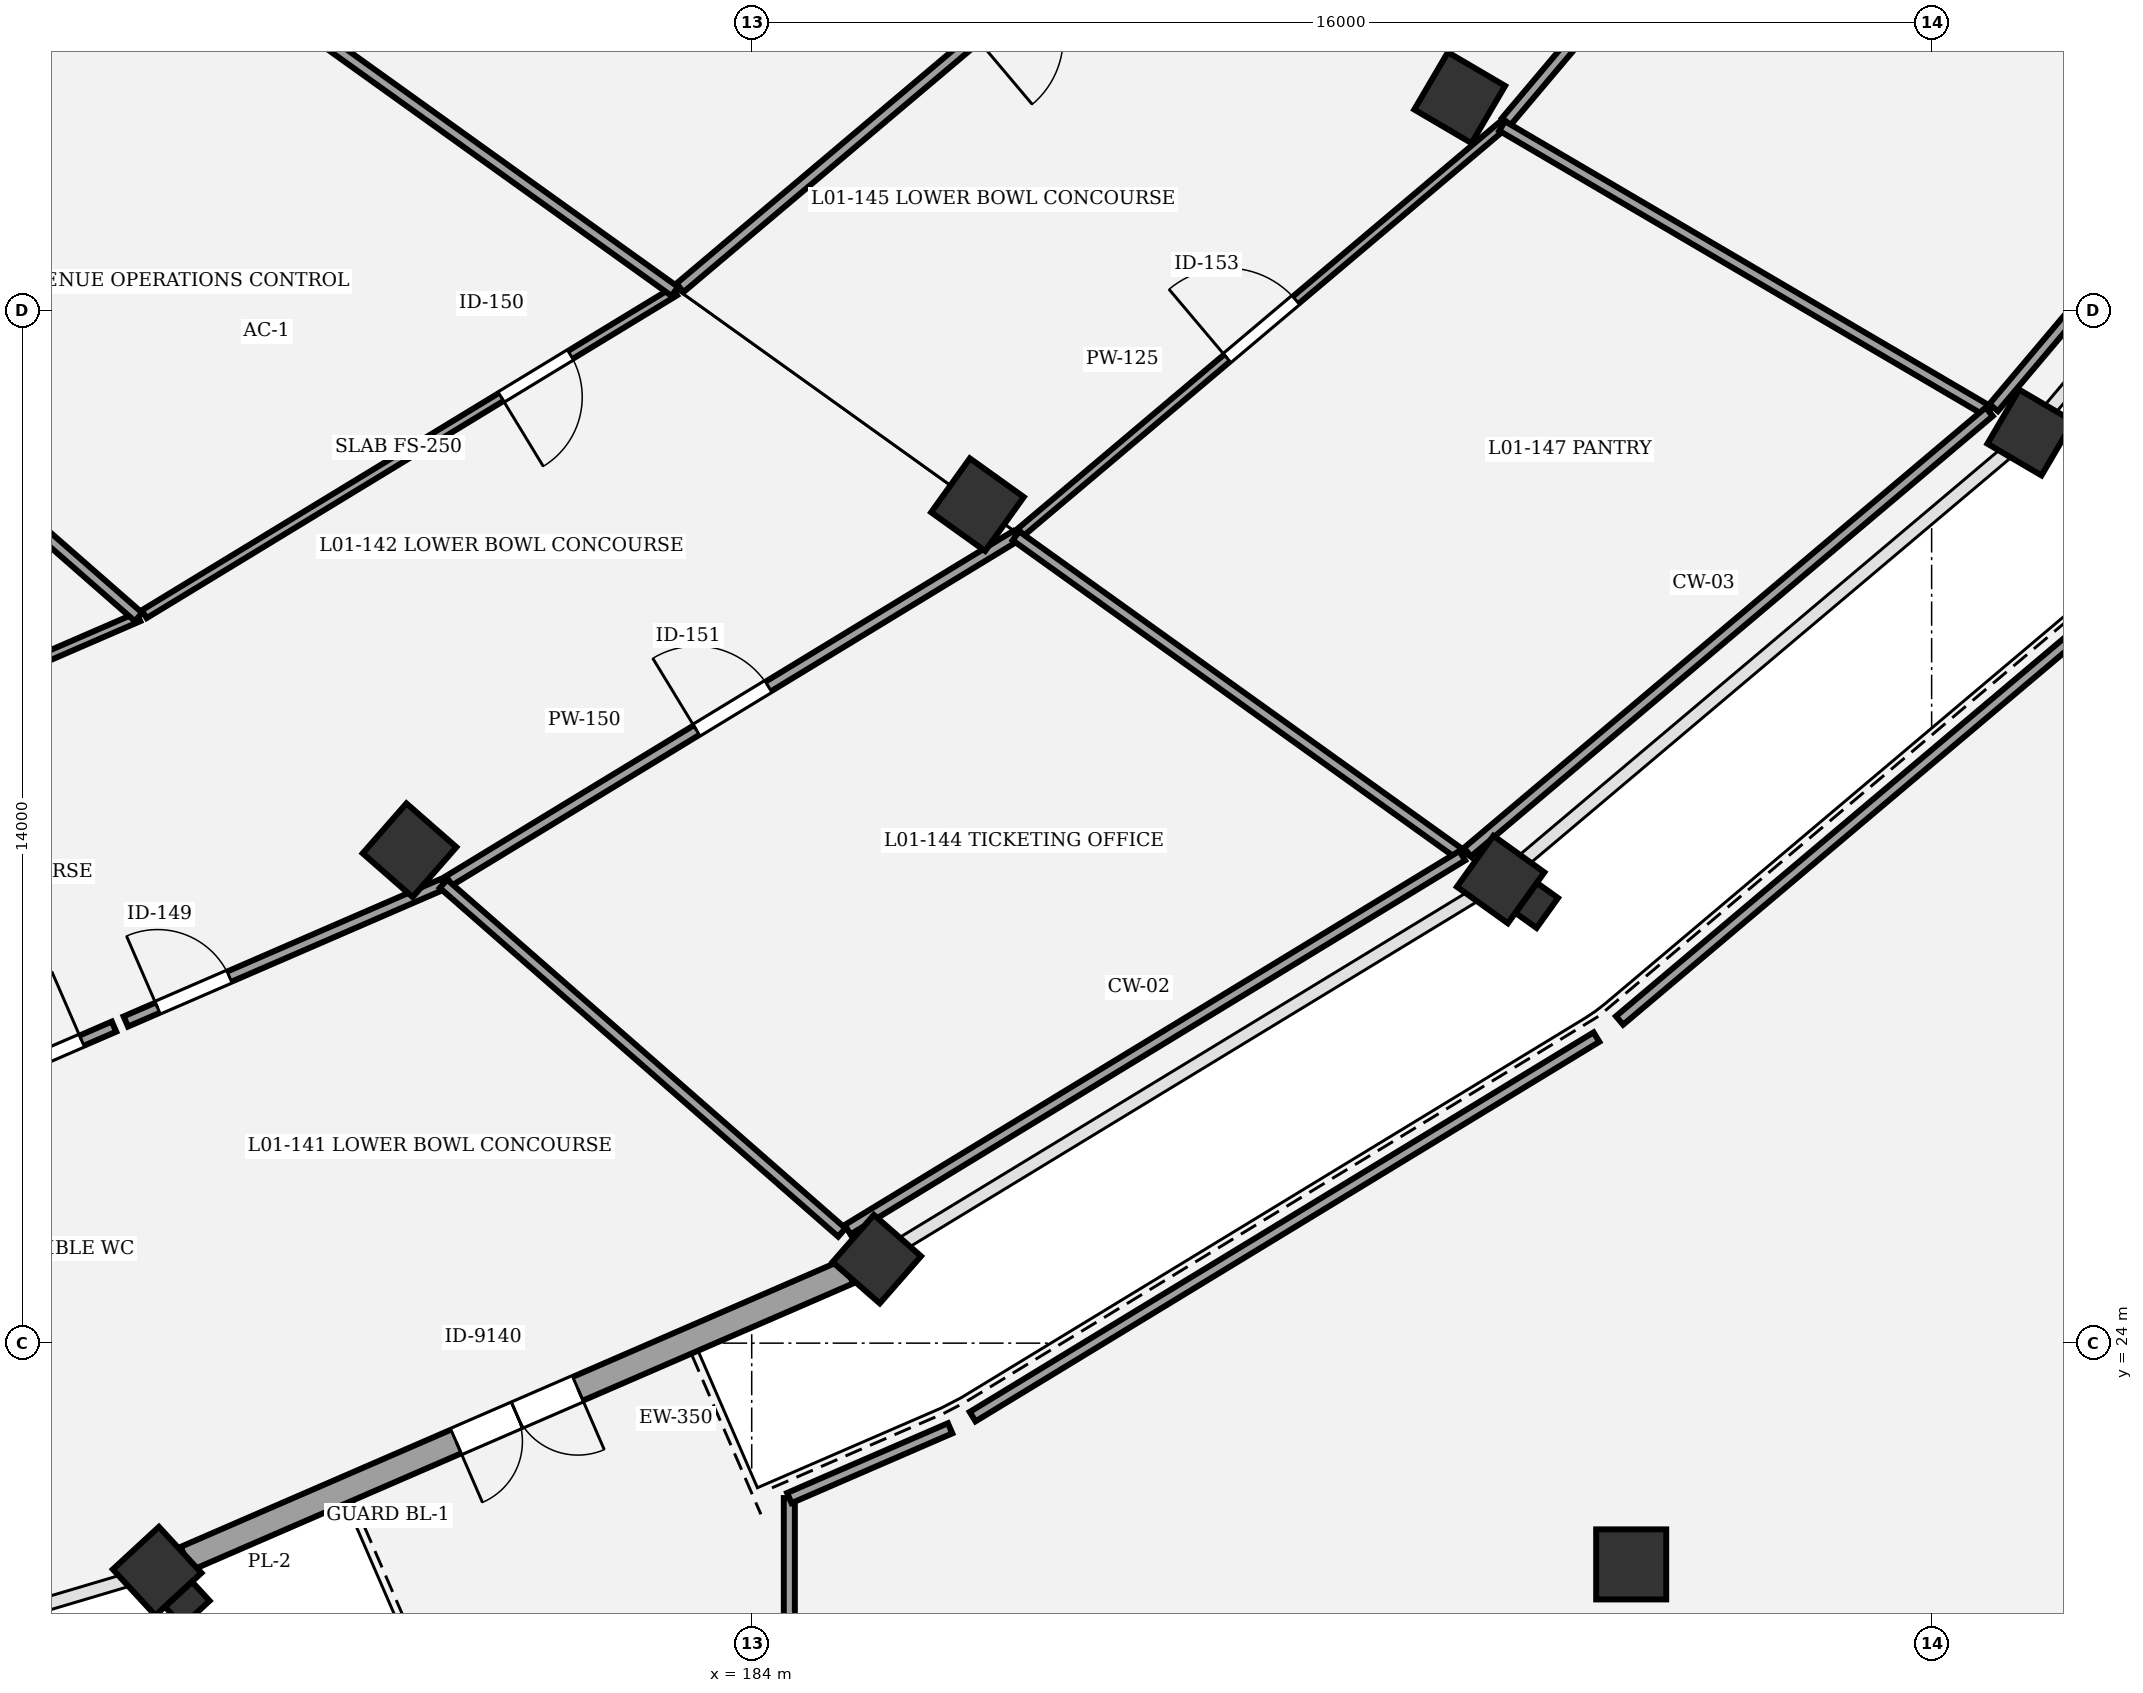
"""IFC4 building model, lengths in metres.
Left out: names, types, materials, properties, quantities, classifications, styles, units other than length and angle.
Written with IfcOpenShell. Run it as: python <this file> out.ifc"""

import sys

from ifc_helpers import new_model, si_unit, direction, frame, frame_2d, origin, origin_2d, place, context, subcontext, project, spatial, rectangle, circle, extrude, element, fill, save


model = new_model("IFC4")
c1 = context("Model", 3, precision=1e-05, world=origin(), true_north=direction((0.0, 1.0)))
c2 = subcontext(c1, "Body", "Model", "MODEL_VIEW")
j1 = project(units=[si_unit("LENGTHUNIT", "METRE"), si_unit("PLANEANGLEUNIT", "RADIAN")], contexts=[c1])
p1 = place(None, origin())
s1 = spatial("IfcSite", under=j1, at=p1, CompositionType="ELEMENT")
p2 = place(p1, origin())
s2 = spatial("IfcBuilding", under=s1, at=p2, CompositionType="ELEMENT")
p3 = place(p2, frame((0.0, 0.0, 5.4)))
s3 = spatial("IfcBuildingStorey", under=s2, at=p3, CompositionType="ELEMENT", Elevation=5.4)
p4 = place(p3, frame((175.938, 20.909, 0.0), z_axis=(0.0, 0.0, 1.0), x_axis=(0.677903094969, -0.735151272753, 0.0)))
e1 = element("IfcColumn", 1, at=p4, inside=s3, PredefinedType="COLUMN", context=c2, shape_type="SweptSolid", body=[
    extrude(rectangle(XDim=0.85, YDim=0.85, at=origin_2d()), origin(), (0.0, 0.0, 1.0), 4.8),
])
p5 = place(p3, frame((176.346, 20.465, 0.0), z_axis=(0.0, 0.0, 1.0), x_axis=(0.735151272753, 0.677903094969, 0.0)))
e2 = element("IfcColumn", 2, at=p5, inside=s3, PredefinedType="PILASTER", context=c2, shape_type="SweptSolid", body=[
    extrude(rectangle(XDim=0.5, YDim=0.35, at=origin_2d()), origin(), (0.0, 0.0, 1.0), 4.8),
])
p6 = place(p3, frame((179.36, 30.683, 0.0), z_axis=(0.0, 0.0, 1.0), x_axis=(0.752529860433, -0.658558128912, 0.0)))
e3 = element("IfcColumn", 3, at=p6, inside=s3, PredefinedType="COLUMN", context=c2, shape_type="SweptSolid", body=[
    extrude(rectangle(XDim=0.9, YDim=0.9, at=origin_2d()), origin(), (0.0, 0.0, 1.0), 4.8),
])
p7 = place(p3, frame((185.696, 25.139, 0.0), z_axis=(0.0, 0.0, 1.0), x_axis=(0.752529860433, -0.658558128912, 0.0)))
e4 = element("IfcColumn", 4, at=p7, inside=s3, PredefinedType="COLUMN", context=c2, shape_type="SweptSolid", body=[
    extrude(rectangle(XDim=0.85, YDim=0.85, at=origin_2d()), origin(), (0.0, 0.0, 1.0), 4.8),
])
p8 = place(p3, frame((187.061, 35.368, 0.0), z_axis=(0.0, 0.0, 1.0), x_axis=(0.812897512265, -0.582406760395, 0.0)))
e5 = element("IfcColumn", 5, at=p8, inside=s3, PredefinedType="COLUMN", context=c2, shape_type="SweptSolid", body=[
    extrude(rectangle(XDim=0.9, YDim=0.9, at=origin_2d()), origin(), (0.0, 0.0, 1.0), 4.8),
])
p9 = place(p3, frame((194.156, 30.285, 0.0), z_axis=(0.0, 0.0, 1.0), x_axis=(0.812897512265, -0.582406760395, 0.0)))
e6 = element("IfcColumn", 6, at=p9, inside=s3, PredefinedType="COLUMN", context=c2, shape_type="SweptSolid", body=[
    extrude(rectangle(XDim=0.85, YDim=0.85, at=origin_2d()), origin(), (0.0, 0.0, 1.0), 4.8),
])
p10 = place(p3, frame((194.646, 29.934, 0.0), z_axis=(0.0, 0.0, 1.0), x_axis=(0.582406760395, 0.812897512265, 0.0)))
e7 = element("IfcColumn", 7, at=p10, inside=s3, PredefinedType="PILASTER", context=c2, shape_type="SweptSolid", body=[
    extrude(rectangle(XDim=0.5, YDim=0.35, at=origin_2d()), origin(), (0.0, 0.0, 1.0), 4.8),
])
p11 = place(p3, frame((193.6, 40.886, 0.0), z_axis=(0.0, 0.0, 1.0), x_axis=(0.862513669207, -0.506033764121, 0.0)))
e8 = element("IfcColumn", 8, at=p11, inside=s3, PredefinedType="COLUMN", context=c2, shape_type="SweptSolid", body=[
    extrude(rectangle(XDim=0.9, YDim=0.9, at=origin_2d()), origin(), (0.0, 0.0, 1.0), 4.8),
])
p12 = place(p3, frame((201.338, 36.346, 0.0), z_axis=(0.0, 0.0, 1.0), x_axis=(0.862513669207, -0.506033764121, 0.0)))
e9 = element("IfcColumn", 9, at=p12, inside=s3, PredefinedType="COLUMN", context=c2, shape_type="SweptSolid", body=[
    extrude(rectangle(XDim=0.85, YDim=0.85, at=origin_2d()), origin(), (0.0, 0.0, 1.0), 4.8),
])
p13 = place(p3, frame((195.926, 21.0, 0.0), z_axis=(0.0, 0.0, 1.0), x_axis=(1.0, 0.0, 0.0)))
e10 = element("IfcColumn", 10, at=p13, inside=s3, PredefinedType="COLUMN", context=c2, shape_type="SweptSolid", body=[
    extrude(circle(Radius=0.475, at=origin_2d()), origin(), (0.0, 0.0, 1.0), 4.8),
])
p14 = place(p3, frame((185.308, 24.971, 0.0), z_axis=(0.0, 0.0, 1.0), x_axis=(-0.91749374913, -0.397750198375, 0.0)))
e11 = element("IfcWall", 11, at=p14, inside=s3, PredefinedType="STANDARD", context=c2, shape_type="SweptSolid", body=[
    extrude(rectangle(XDim=9.79, YDim=0.35, at=frame_2d((4.895, 0.0))), origin(), (0.0, 0.0, 1.0), 3.57),
])
p15 = place(p14, frame((3.995, 0.0, 0.0)))
e12 = element("IfcOpeningElement", 12, at=p15, cuts=e11, PredefinedType="OPENING", context=c2, shape_type="SweptSolid", body=[
    extrude(rectangle(XDim=1.8, YDim=2.4, at=frame_2d((0.9, 1.2))), frame((0.0, 0.185, 0.0), z_axis=(0.0, -1.0, 0.0), x_axis=(1.0, 0.0, 0.0)), (0.0, 0.0, 1.0), 0.37),
])
p16 = place(p3, frame((175.685, 33.846, 0.0), z_axis=(0.0, 0.0, 1.0), x_axis=(-0.917494590455, -0.397748257677, 0.0)))
e13 = element("IfcWall", 13, at=p16, inside=s3, PredefinedType="PARTITIONING", context=c2, shape_type="SweptSolid", body=[
    extrude(rectangle(XDim=9.049, YDim=0.125, at=frame_2d((4.525, 0.0))), origin(), (0.0, 0.0, 1.0), 3.55),
])
p17 = place(p16, frame((1.806, 0.0, 0.0)))
e14 = element("IfcOpeningElement", 14, at=p17, cuts=e13, PredefinedType="OPENING", context=c2, shape_type="SweptSolid", body=[
    extrude(rectangle(XDim=0.98, YDim=2.1, at=frame_2d((0.49, 1.05))), frame((0.0, 0.073, 0.0), z_axis=(0.0, -1.0, 0.0), x_axis=(1.0, 0.0, 0.0)), (0.0, 0.0, 1.0), 0.145),
])
p18 = place(p3, frame((170.946, 26.381, 0.0), z_axis=(0.0, 0.0, 1.0), x_axis=(0.917504308061, 0.397725841114, 0.0)))
e15 = element("IfcWall", 15, at=p18, inside=s3, PredefinedType="PARTITIONING", context=c2, shape_type="SweptSolid", body=[
    extrude(rectangle(XDim=4.803, YDim=0.15, at=frame_2d((2.401, 0.0))), origin(), (0.0, 0.0, 1.0), 3.55),
])
p19 = place(p18, frame((3.306, 0.0, 0.0)))
e16 = element("IfcOpeningElement", 16, at=p19, cuts=e15, PredefinedType="OPENING", context=c2, shape_type="SweptSolid", body=[
    extrude(rectangle(XDim=1.02, YDim=2.1, at=frame_2d((0.51, 1.05))), frame((0.0, 0.085, 0.0), z_axis=(0.0, -1.0, 0.0), x_axis=(1.0, 0.0, 0.0)), (0.0, 0.0, 1.0), 0.17),
])
p20 = place(p3, frame((175.513, 28.361, 0.0), z_axis=(0.0, 0.0, 1.0), x_axis=(0.917515143301, 0.397700844622, 0.0)))
e17 = element("IfcWall", 17, at=p20, inside=s3, PredefinedType="PARTITIONING", context=c2, shape_type="SweptSolid", body=[
    extrude(rectangle(XDim=4.694, YDim=0.15, at=frame_2d((2.347, 0.0))), origin(), (0.0, 0.0, 1.0), 3.55),
])
p21 = place(p20, frame((0.47, 0.0, 0.0)))
e18 = element("IfcOpeningElement", 18, at=p21, cuts=e17, PredefinedType="OPENING", context=c2, shape_type="SweptSolid", body=[
    extrude(rectangle(XDim=1.06, YDim=2.1, at=frame_2d((0.53, 1.05))), frame((0.0, 0.085, 0.0), z_axis=(0.0, -1.0, 0.0), x_axis=(1.0, 0.0, 0.0)), (0.0, 0.0, 1.0), 0.17),
])
p22 = place(p3, frame((182.957, 38.26, 0.0), z_axis=(0.0, 0.0, 1.0), x_axis=(-0.854330104408, -0.519730769439, 0.0)))
e19 = element("IfcWall", 19, at=p22, inside=s3, PredefinedType="PARTITIONING", context=c2, shape_type="SweptSolid", body=[
    extrude(rectangle(XDim=8.42, YDim=0.125, at=frame_2d((4.21, 0.0))), origin(), (0.0, 0.0, 1.0), 3.55),
])
p23 = place(p22, frame((1.656, 0.0, 0.0)))
e20 = element("IfcOpeningElement", 20, at=p23, cuts=e19, PredefinedType="OPENING", context=c2, shape_type="SweptSolid", body=[
    extrude(rectangle(XDim=1.1, YDim=2.1, at=frame_2d((0.55, 1.05))), frame((0.0, 0.073, 0.0), z_axis=(0.0, -1.0, 0.0), x_axis=(1.0, 0.0, 0.0)), (0.0, 0.0, 1.0), 0.145),
])
p24 = place(p3, frame((179.895, 30.269, 0.0), z_axis=(0.0, 0.0, 1.0), x_axis=(0.854321649351, 0.519744667554, 0.0)))
e21 = element("IfcWall", 21, at=p24, inside=s3, PredefinedType="PARTITIONING", context=c2, shape_type="SweptSolid", body=[
    extrude(rectangle(XDim=8.999, YDim=0.15, at=frame_2d((4.499, 0.0))), origin(), (0.0, 0.0, 1.0), 3.55),
])
p25 = place(p24, frame((3.929, 0.0, 0.0)))
e22 = element("IfcOpeningElement", 22, at=p25, cuts=e21, PredefinedType="OPENING", context=c2, shape_type="SweptSolid", body=[
    extrude(rectangle(XDim=1.14, YDim=2.1, at=frame_2d((0.57, 1.05))), frame((0.0, 0.085, 0.0), z_axis=(0.0, -1.0, 0.0), x_axis=(1.0, 0.0, 0.0)), (0.0, 0.0, 1.0), 0.17),
])
p26 = place(p3, frame((189.133, 43.461, 0.0), z_axis=(0.0, 0.0, 1.0), x_axis=(-0.764249122867, -0.644921141068, 0.0)))
e23 = element("IfcWall", 23, at=p26, inside=s3, PredefinedType="PARTITIONING", context=c2, shape_type="SweptSolid", body=[
    extrude(rectangle(XDim=7.99, YDim=0.15, at=frame_2d((3.995, 0.0))), origin(), (0.0, 0.0, 1.0), 3.55),
])
p27 = place(p26, frame((1.554, 0.0, 0.0)))
e24 = element("IfcOpeningElement", 24, at=p27, cuts=e23, PredefinedType="OPENING", context=c2, shape_type="SweptSolid", body=[
    extrude(rectangle(XDim=1.18, YDim=2.1, at=frame_2d((0.59, 1.05))), frame((0.0, 0.085, 0.0), z_axis=(0.0, -1.0, 0.0), x_axis=(1.0, 0.0, 0.0)), (0.0, 0.0, 1.0), 0.17),
])
p28 = place(p3, frame((187.649, 34.996, 0.0), z_axis=(0.0, 0.0, 1.0), x_axis=(0.764257572309, 0.644911128117, 0.0)))
e25 = element("IfcWall", 25, at=p28, inside=s3, PredefinedType="PARTITIONING", context=c2, shape_type="SweptSolid", body=[
    extrude(rectangle(XDim=8.539, YDim=0.125, at=frame_2d((4.269, 0.0))), origin(), (0.0, 0.0, 1.0), 3.55),
])
p29 = place(p28, frame((3.659, 0.0, 0.0)))
e26 = element("IfcOpeningElement", 26, at=p29, cuts=e25, PredefinedType="OPENING", context=c2, shape_type="SweptSolid", body=[
    extrude(rectangle(XDim=1.22, YDim=2.1, at=frame_2d((0.61, 1.05))), frame((0.0, 0.073, 0.0), z_axis=(0.0, -1.0, 0.0), x_axis=(1.0, 0.0, 0.0)), (0.0, 0.0, 1.0), 0.145),
])
p30 = place(p3, frame((194.232, 40.562, 0.0), z_axis=(0.0, 0.0, 1.0), x_axis=(0.64516519871, 0.76404310505, 0.0)))
e27 = element("IfcWall", 27, at=p30, inside=s3, PredefinedType="PARTITIONING", context=c2, shape_type="SweptSolid", body=[
    extrude(rectangle(XDim=8.313, YDim=0.15, at=frame_2d((4.157, 0.0))), origin(), (0.0, 0.0, 1.0), 3.55),
])
p31 = place(p30, frame((3.497, 0.0, 0.0)))
e28 = element("IfcOpeningElement", 28, at=p31, cuts=e27, PredefinedType="OPENING", context=c2, shape_type="SweptSolid", body=[
    extrude(rectangle(XDim=1.32, YDim=2.1, at=frame_2d((0.66, 1.05))), frame((0.0, 0.085, 0.0), z_axis=(0.0, -1.0, 0.0), x_axis=(1.0, 0.0, 0.0)), (0.0, 0.0, 1.0), 0.17),
])
p32 = place(p3, frame((169.415, 39.332, 0.0), z_axis=(0.0, 0.0, 1.0), x_axis=(0.752576694707, -0.658504607869, 0.0)))
e29 = element("IfcWall", 29, at=p32, inside=s3, PredefinedType="PARTITIONING", context=c2, shape_type="SweptSolid", body=[
    extrude(rectangle(XDim=8.331, YDim=0.15, at=frame_2d((4.166, 0.0))), origin(), (0.0, 0.0, 1.0), 3.55),
])
p33 = place(p3, frame((179.82, 30.228, 0.0), z_axis=(0.0, 0.0, 1.0), x_axis=(0.752576694707, -0.658504607869, 0.0)))
e30 = element("IfcWall", 30, at=p33, inside=s3, PredefinedType="PARTITIONING", context=c2, shape_type="SweptSolid", body=[
    extrude(rectangle(XDim=7.178, YDim=0.15, at=frame_2d((3.589, 0.0))), origin(), (0.0, 0.0, 1.0), 3.55),
])
p34 = place(p3, frame((169.49, 39.373, 0.0), z_axis=(0.0, 0.0, 1.0), x_axis=(0.854343551339, 0.519708664817, 0.0)))
e31 = element("IfcWall", 31, at=p34, inside=s3, PredefinedType="PARTITIONING", context=c2, shape_type="SweptSolid", body=[
    extrude(rectangle(XDim=7.542, YDim=0.15, at=frame_2d((3.771, 0.0))), origin(), (0.0, 0.0, 1.0), 3.55),
])
p35 = place(p3, frame((175.933, 43.292, 0.0), z_axis=(0.0, 0.0, 1.0), x_axis=(0.812884908791, -0.582424351363, 0.0)))
e32 = element("IfcWall", 32, at=p35, inside=s3, PredefinedType="PARTITIONING", context=c2, shape_type="SweptSolid", body=[
    extrude(rectangle(XDim=8.64, YDim=0.15, at=frame_2d((4.32, 0.0))), origin(), (0.0, 0.0, 1.0), 3.55),
])
p36 = place(p3, frame((187.582, 34.946, 0.0), z_axis=(0.0, 0.0, 1.0), x_axis=(0.812888534941, -0.582419290342, 0.0)))
e33 = element("IfcWall", 33, at=p36, inside=s3, PredefinedType="PARTITIONING", context=c2, shape_type="SweptSolid", body=[
    extrude(rectangle(XDim=7.446, YDim=0.15, at=frame_2d((3.723, 0.0))), origin(), (0.0, 0.0, 1.0), 3.55),
])
p37 = place(p3, frame((193.635, 30.609, 0.0), z_axis=(0.0, 0.0, 1.0), x_axis=(-0.854323689683, -0.519741313777, 0.0)))
e34 = element("IfcWall", 34, at=p37, inside=s3, PredefinedType="PARTITIONING", context=c2, shape_type="SweptSolid", body=[
    extrude(rectangle(XDim=9.756, YDim=0.15, at=frame_2d((4.878, 0.0))), origin(), (0.0, 0.0, 1.0), 3.55),
])
p38 = place(p3, frame((194.175, 40.503, 0.0), z_axis=(0.0, 0.0, 1.0), x_axis=(0.862503200943, -0.506051606422, 0.0)))
e35 = element("IfcWall", 35, at=p38, inside=s3, PredefinedType="PARTITIONING", context=c2, shape_type="SweptSolid", body=[
    extrude(rectangle(XDim=7.659, YDim=0.15, at=frame_2d((3.829, 0.0))), origin(), (0.0, 0.0, 1.0), 3.55),
])
p39 = place(p3, frame((200.781, 36.627, 0.0), z_axis=(0.0, 0.0, 1.0), x_axis=(-0.764252893528, -0.644916672706, 0.0)))
e36 = element("IfcWall", 36, at=p39, inside=s3, PredefinedType="PARTITIONING", context=c2, shape_type="SweptSolid", body=[
    extrude(rectangle(XDim=9.257, YDim=0.15, at=frame_2d((4.629, 0.0))), origin(), (0.0, 0.0, 1.0), 3.55),
])
p40 = place(p3, frame((206.656, 43.572, 0.0), z_axis=(0.0, 0.0, 1.0), x_axis=(-0.645166061073, -0.764042376861, 0.0)))
e37 = element("IfcWall", 37, at=p40, inside=s3, PredefinedType="PARTITIONING", context=c2, shape_type="SweptSolid", body=[
    extrude(rectangle(XDim=9.014, YDim=0.15, at=frame_2d((4.507, 0.0))), origin(), (0.0, 0.0, 1.0), 3.55),
])
p41 = place(p3, frame((184.51, 18.66, 0.0), z_axis=(0.0, 0.0, 1.0), x_axis=(0.0, 1.0, 0.0)))
e38 = element("IfcWall", 38, at=p41, inside=s3, PredefinedType="PARTITIONING", context=c2, shape_type="SweptSolid", body=[
    extrude(rectangle(XDim=3.24, YDim=0.15, at=frame_2d((1.62, 0.0))), origin(), (0.0, 0.0, 1.0), 3.55),
])
p42 = place(p3, frame((184.51, 21.9, 0.0), z_axis=(0.0, 0.0, 1.0), x_axis=(0.917484400903, 0.397771761314, 0.0)))
e39 = element("IfcWall", 39, at=p42, inside=s3, PredefinedType="PARTITIONING", context=c2, shape_type="SweptSolid", body=[
    extrude(rectangle(XDim=2.376, YDim=0.15, at=frame_2d((1.188, 0.0))), origin(), (0.0, 0.0, 1.0), 3.55),
])
p43 = place(p3, frame((186.996, 23.003, 0.0), z_axis=(0.0, 0.0, 1.0), x_axis=(0.854333268174, 0.519725568826, 0.0)))
e40 = element("IfcWall", 40, at=p43, inside=s3, PredefinedType="PARTITIONING", context=c2, shape_type="SweptSolid", body=[
    extrude(rectangle(XDim=9.902, YDim=0.15, at=frame_2d((4.951, 0.0))), origin(), (0.0, 0.0, 1.0), 3.55),
])
p44 = place(p3, frame((195.768, 28.375, 0.0), z_axis=(0.0, 0.0, 1.0), x_axis=(0.76426547638, 0.644901761212, 0.0)))
e41 = element("IfcWall", 41, at=p44, inside=s3, PredefinedType="PARTITIONING", context=c2, shape_type="SweptSolid", body=[
    extrude(rectangle(XDim=9.398, YDim=0.15, at=frame_2d((4.699, 0.0))), origin(), (0.0, 0.0, 1.0), 3.55),
])
p45 = place(p15, origin())
e42 = element("IfcDoor", 42, at=p45, inside=s3, OperationType="DOUBLE_DOOR_SINGLE_SWING", PredefinedType="DOOR", context=c2, shape_type="SweptSolid", body=[
    extrude(rectangle(XDim=1.8, YDim=2.4, at=frame_2d((0.9, 1.2))), frame((0.0, 0.025, 0.0), z_axis=(0.0, -1.0, 0.0), x_axis=(1.0, 0.0, 0.0)), (0.0, 0.0, 1.0), 0.05),
])
fill(e12, e42)
p46 = place(p19, origin())
e43 = element("IfcDoor", 43, at=p46, inside=s3, OperationType="SINGLE_SWING_RIGHT", PredefinedType="DOOR", context=c2, shape_type="SweptSolid", body=[
    extrude(rectangle(XDim=1.02, YDim=2.1, at=frame_2d((0.51, 1.05))), frame((0.0, 0.025, 0.0), z_axis=(0.0, -1.0, 0.0), x_axis=(1.0, 0.0, 0.0)), (0.0, 0.0, 1.0), 0.05),
])
fill(e16, e43)
p47 = place(p21, origin())
e44 = element("IfcDoor", 44, at=p47, inside=s3, OperationType="SINGLE_SWING_LEFT", PredefinedType="DOOR", context=c2, shape_type="SweptSolid", body=[
    extrude(rectangle(XDim=1.06, YDim=2.1, at=frame_2d((0.53, 1.05))), frame((0.0, 0.025, 0.0), z_axis=(0.0, -1.0, 0.0), x_axis=(1.0, 0.0, 0.0)), (0.0, 0.0, 1.0), 0.05),
])
fill(e18, e44)
p48 = place(p23, origin())
e45 = element("IfcDoor", 45, at=p48, inside=s3, OperationType="SINGLE_SWING_RIGHT", PredefinedType="DOOR", context=c2, shape_type="SweptSolid", body=[
    extrude(rectangle(XDim=1.1, YDim=2.1, at=frame_2d((0.55, 1.05))), frame((0.0, 0.025, 0.0), z_axis=(0.0, -1.0, 0.0), x_axis=(1.0, 0.0, 0.0)), (0.0, 0.0, 1.0), 0.05),
])
fill(e20, e45)
p49 = place(p25, origin())
e46 = element("IfcDoor", 46, at=p49, inside=s3, OperationType="SINGLE_SWING_LEFT", PredefinedType="DOOR", context=c2, shape_type="SweptSolid", body=[
    extrude(rectangle(XDim=1.14, YDim=2.1, at=frame_2d((0.57, 1.05))), frame((0.0, 0.025, 0.0), z_axis=(0.0, -1.0, 0.0), x_axis=(1.0, 0.0, 0.0)), (0.0, 0.0, 1.0), 0.05),
])
fill(e22, e46)
p50 = place(p29, origin())
e47 = element("IfcDoor", 47, at=p50, inside=s3, OperationType="SINGLE_SWING_LEFT", PredefinedType="DOOR", context=c2, shape_type="SweptSolid", body=[
    extrude(rectangle(XDim=1.22, YDim=2.1, at=frame_2d((0.61, 1.05))), frame((0.0, 0.025, 0.0), z_axis=(0.0, -1.0, 0.0), x_axis=(1.0, 0.0, 0.0)), (0.0, 0.0, 1.0), 0.05),
])
fill(e26, e47)
save(model, sys.argv[1])
